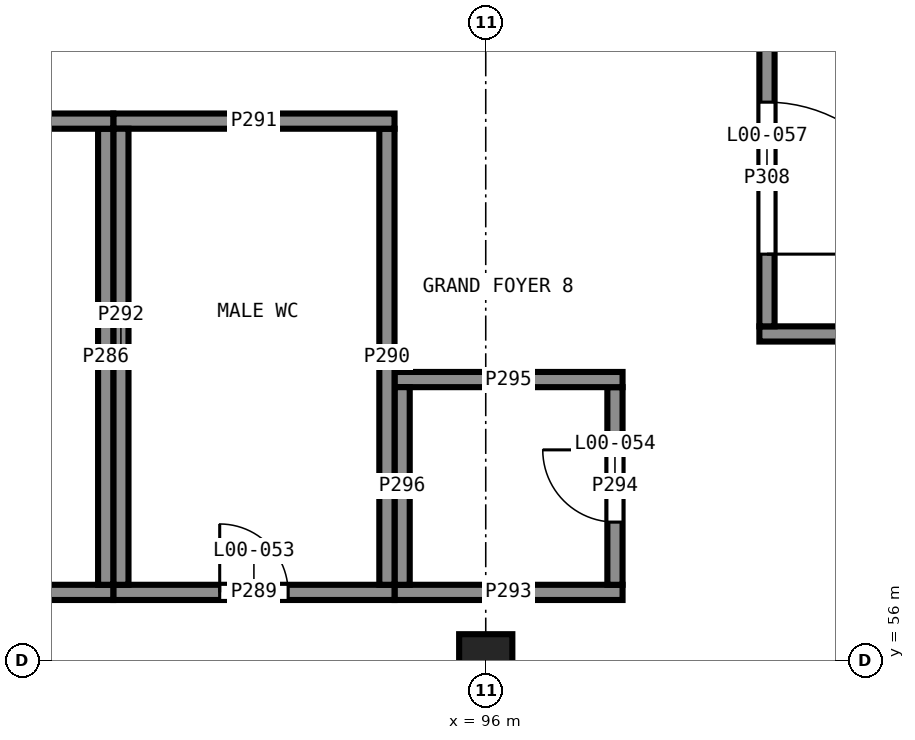
"""IFC4 building model, lengths in metres.
Left out: names, types, materials, properties, quantities, classifications, styles, units other than length and angle.
Written with IfcOpenShell. Run it as: python <this file> out.ifc"""

import sys

from ifc_helpers import new_model, si_unit, direction, frame, frame_2d, origin, origin_2d, place, context, subcontext, project, spatial, rectangle, extrude, element, fill, save


model = new_model("IFC4")
c1 = context("Model", 3, precision=1e-05, world=origin(), true_north=direction((0.0, 1.0)))
c2 = subcontext(c1, "Body", "Model", "MODEL_VIEW")
j1 = project(units=[si_unit("LENGTHUNIT", "METRE"), si_unit("PLANEANGLEUNIT", "RADIAN")], contexts=[c1])
p1 = place(None, origin())
s1 = spatial("IfcSite", under=j1, at=p1, CompositionType="ELEMENT")
p2 = place(p1, origin())
s2 = spatial("IfcBuilding", under=s1, at=p2, CompositionType="ELEMENT")
p3 = place(p2, origin())
s3 = spatial("IfcBuildingStorey", under=s2, at=p3, CompositionType="ELEMENT", Elevation=0.0)
p4 = place(p3, frame((96.0, 56.0, 0.0), z_axis=(0.0, 0.0, 1.0), x_axis=(1.0, 0.0, 0.0)))
e1 = element("IfcColumn", 1, at=p4, inside=s3, PredefinedType="COLUMN", context=c2, shape_type="SweptSolid", body=[
    extrude(rectangle(XDim=0.7, YDim=0.7, at=origin_2d()), origin(), (0.0, 0.0, 1.0), 5.5),
])
p5 = place(p3, frame((87.4, 56.9, 0.0), z_axis=(0.0, 0.0, 1.0), x_axis=(1.0, 0.0, 0.0)))
e2 = element("IfcWall", 2, at=p5, inside=s3, PredefinedType="PARTITIONING", context=c2, shape_type="SweptSolid", body=[
    extrude(rectangle(XDim=3.7, YDim=0.2, at=frame_2d((1.85, 0.0))), origin(), (0.0, 0.0, 1.0), 5.2),
])
p6 = place(p5, frame((1.4, 0.0, 0.0)))
e3 = element("IfcOpeningElement", 3, at=p6, cuts=e2, PredefinedType="OPENING", context=c2, shape_type="SweptSolid", body=[
    extrude(rectangle(XDim=0.9, YDim=2.1, at=frame_2d((0.45, 1.05))), frame((0.0, 0.11, 0.0), z_axis=(0.0, -1.0, 0.0), x_axis=(1.0, 0.0, 0.0)), (0.0, 0.0, 1.0), 0.22),
])
p7 = place(p3, frame((91.0, 57.0, 0.0), z_axis=(0.0, 0.0, 1.0), x_axis=(0.0, 1.0, 0.0)))
e4 = element("IfcWall", 4, at=p7, inside=s3, PredefinedType="PARTITIONING", context=c2, shape_type="SweptSolid", body=[
    extrude(rectangle(XDim=6.0, YDim=0.2, at=frame_2d((3.0, 0.0))), origin(), (0.0, 0.0, 1.0), 5.2),
])
p8 = place(p3, frame((91.1, 63.1, 0.0), z_axis=(0.0, 0.0, 1.0), x_axis=(-1.0, 0.0, 0.0)))
e5 = element("IfcWall", 5, at=p8, inside=s3, PredefinedType="PARTITIONING", context=c2, shape_type="SweptSolid", body=[
    extrude(rectangle(XDim=3.7, YDim=0.2, at=frame_2d((1.85, 0.0))), origin(), (0.0, 0.0, 1.0), 5.2),
])
p9 = place(p3, frame((91.1, 56.9, 0.0), z_axis=(0.0, 0.0, 1.0), x_axis=(1.0, 0.0, 0.0)))
e6 = element("IfcWall", 6, at=p9, inside=s3, PredefinedType="PARTITIONING", context=c2, shape_type="SweptSolid", body=[
    extrude(rectangle(XDim=3.7, YDim=0.2, at=frame_2d((1.85, 0.0))), origin(), (0.0, 0.0, 1.0), 5.2),
])
p10 = place(p9, frame((1.4, 0.0, 0.0)))
e7 = element("IfcOpeningElement", 7, at=p10, cuts=e6, PredefinedType="OPENING", context=c2, shape_type="SweptSolid", body=[
    extrude(rectangle(XDim=0.9, YDim=2.1, at=frame_2d((0.45, 1.05))), frame((0.0, 0.11, 0.0), z_axis=(0.0, -1.0, 0.0), x_axis=(1.0, 0.0, 0.0)), (0.0, 0.0, 1.0), 0.22),
])
p11 = place(p3, frame((94.7, 57.0, 0.0), z_axis=(0.0, 0.0, 1.0), x_axis=(0.0, 1.0, 0.0)))
e8 = element("IfcWall", 8, at=p11, inside=s3, PredefinedType="PARTITIONING", context=c2, shape_type="SweptSolid", body=[
    extrude(rectangle(XDim=6.0, YDim=0.2, at=frame_2d((3.0, 0.0))), origin(), (0.0, 0.0, 1.0), 5.2),
])
p12 = place(p3, frame((94.8, 63.1, 0.0), z_axis=(0.0, 0.0, 1.0), x_axis=(-1.0, 0.0, 0.0)))
e9 = element("IfcWall", 9, at=p12, inside=s3, PredefinedType="PARTITIONING", context=c2, shape_type="SweptSolid", body=[
    extrude(rectangle(XDim=3.7, YDim=0.2, at=frame_2d((1.85, 0.0))), origin(), (0.0, 0.0, 1.0), 5.2),
])
p13 = place(p3, frame((91.2, 63.0, 0.0), z_axis=(0.0, 0.0, 1.0), x_axis=(0.0, -1.0, 0.0)))
e10 = element("IfcWall", 10, at=p13, inside=s3, PredefinedType="PARTITIONING", context=c2, shape_type="SweptSolid", body=[
    extrude(rectangle(XDim=6.0, YDim=0.2, at=frame_2d((3.0, 0.0))), origin(), (0.0, 0.0, 1.0), 5.2),
])
p14 = place(p3, frame((94.8, 56.9, 0.0), z_axis=(0.0, 0.0, 1.0), x_axis=(1.0, 0.0, 0.0)))
e11 = element("IfcWall", 11, at=p14, inside=s3, PredefinedType="PARTITIONING", context=c2, shape_type="SweptSolid", body=[
    extrude(rectangle(XDim=3.0, YDim=0.2, at=frame_2d((1.5, 0.0))), origin(), (0.0, 0.0, 1.0), 5.2),
])
p15 = place(p3, frame((97.7, 57.0, 0.0), z_axis=(0.0, 0.0, 1.0), x_axis=(0.0, 1.0, 0.0)))
e12 = element("IfcWall", 12, at=p15, inside=s3, PredefinedType="PARTITIONING", context=c2, shape_type="SweptSolid", body=[
    extrude(rectangle(XDim=2.6, YDim=0.2, at=frame_2d((1.3, 0.0))), origin(), (0.0, 0.0, 1.0), 5.2),
])
p16 = place(p15, frame((0.825, 0.0, 0.0)))
e13 = element("IfcOpeningElement", 13, at=p16, cuts=e12, PredefinedType="OPENING", context=c2, shape_type="SweptSolid", body=[
    extrude(rectangle(XDim=0.95, YDim=2.1, at=frame_2d((0.475, 1.05))), frame((0.0, 0.11, 0.0), z_axis=(0.0, -1.0, 0.0), x_axis=(1.0, 0.0, 0.0)), (0.0, 0.0, 1.0), 0.22),
])
p17 = place(p3, frame((97.8, 59.7, 0.0), z_axis=(0.0, 0.0, 1.0), x_axis=(-1.0, 0.0, 0.0)))
e14 = element("IfcWall", 14, at=p17, inside=s3, PredefinedType="PARTITIONING", context=c2, shape_type="SweptSolid", body=[
    extrude(rectangle(XDim=3.0, YDim=0.2, at=frame_2d((1.5, 0.0))), origin(), (0.0, 0.0, 1.0), 5.2),
])
p18 = place(p3, frame((94.9, 59.6, 0.0), z_axis=(0.0, 0.0, 1.0), x_axis=(0.0, -1.0, 0.0)))
e15 = element("IfcWall", 15, at=p18, inside=s3, PredefinedType="PARTITIONING", context=c2, shape_type="SweptSolid", body=[
    extrude(rectangle(XDim=2.6, YDim=0.2, at=frame_2d((1.3, 0.0))), origin(), (0.0, 0.0, 1.0), 5.2),
])
p19 = place(p3, frame((99.6, 60.3, 0.0), z_axis=(0.0, 0.0, 1.0), x_axis=(1.0, 0.0, 0.0)))
e16 = element("IfcWall", 16, at=p19, inside=s3, PredefinedType="PARTITIONING", context=c2, shape_type="SweptSolid", body=[
    extrude(rectangle(XDim=8.8, YDim=0.2, at=frame_2d((4.4, 0.0))), origin(), (0.0, 0.0, 1.0), 5.2),
])
p20 = place(p3, frame((99.7, 64.3, 0.0), z_axis=(0.0, 0.0, 1.0), x_axis=(0.0, -1.0, 0.0)))
e17 = element("IfcWall", 17, at=p20, inside=s3, PredefinedType="PARTITIONING", context=c2, shape_type="SweptSolid", body=[
    extrude(rectangle(XDim=3.9, YDim=0.2, at=frame_2d((1.95, 0.0))), origin(), (0.0, 0.0, 1.0), 5.2),
])
p21 = place(p20, frame((0.95, 0.0, 0.0)))
e18 = element("IfcOpeningElement", 18, at=p21, cuts=e17, PredefinedType="OPENING", context=c2, shape_type="SweptSolid", body=[
    extrude(rectangle(XDim=2.0, YDim=2.1, at=frame_2d((1.0, 1.05))), frame((0.0, 0.11, 0.0), z_axis=(0.0, -1.0, 0.0), x_axis=(1.0, 0.0, 0.0)), (0.0, 0.0, 1.0), 0.22),
])
p22 = place(p10, origin())
e19 = element("IfcDoor", 19, at=p22, inside=s3, OperationType="SINGLE_SWING_RIGHT", PredefinedType="DOOR", context=c2, shape_type="SweptSolid", body=[
    extrude(rectangle(XDim=0.9, YDim=2.1, at=frame_2d((0.45, 1.05))), frame((0.0, 0.025, 0.0), z_axis=(0.0, -1.0, 0.0), x_axis=(1.0, 0.0, 0.0)), (0.0, 0.0, 1.0), 0.05),
])
fill(e7, e19)
p23 = place(p16, origin())
e20 = element("IfcDoor", 20, at=p23, inside=s3, OperationType="SINGLE_SWING_LEFT", PredefinedType="DOOR", context=c2, shape_type="SweptSolid", body=[
    extrude(rectangle(XDim=0.95, YDim=2.1, at=frame_2d((0.475, 1.05))), frame((0.0, 0.025, 0.0), z_axis=(0.0, -1.0, 0.0), x_axis=(1.0, 0.0, 0.0)), (0.0, 0.0, 1.0), 0.05),
])
fill(e13, e20)
p24 = place(p21, origin())
e21 = element("IfcDoor", 21, at=p24, inside=s3, OperationType="DOUBLE_DOOR_SINGLE_SWING", PredefinedType="DOOR", context=c2, shape_type="SweptSolid", body=[
    extrude(rectangle(XDim=2.0, YDim=2.1, at=frame_2d((1.0, 1.05))), frame((0.0, 0.025, 0.0), z_axis=(0.0, -1.0, 0.0), x_axis=(1.0, 0.0, 0.0)), (0.0, 0.0, 1.0), 0.05),
])
fill(e18, e21)
save(model, sys.argv[1])
